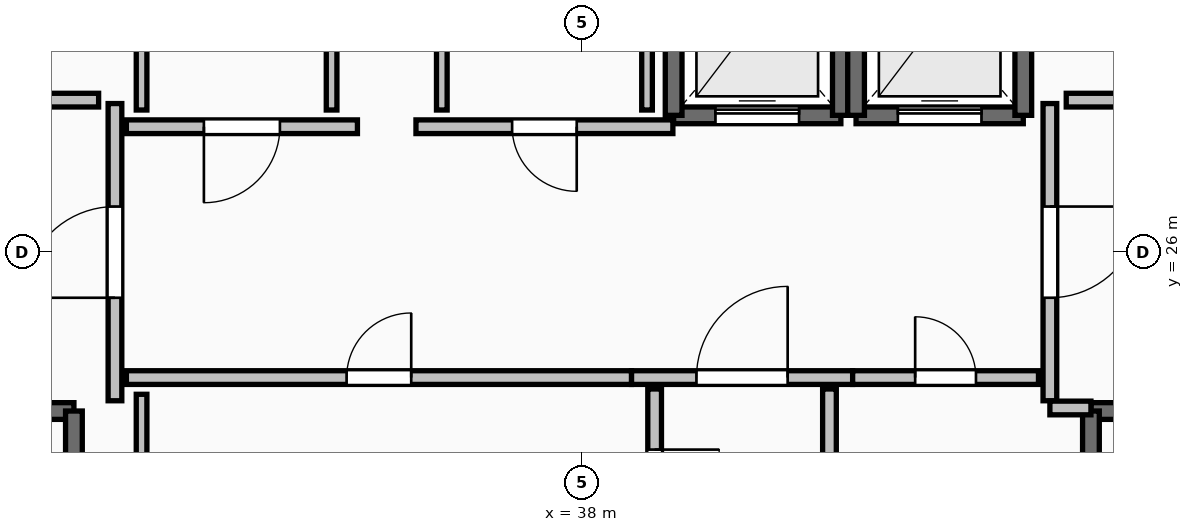
"""IFC4 building model, lengths in metres.
Left out: names, types, materials, properties, quantities, classifications, styles, units other than length and angle.
Written with IfcOpenShell. Run it as: python <this file> out.ifc"""

import sys

from ifc_helpers import new_model, si_unit, direction, frame, frame_2d, origin, place, context, subcontext, project, spatial, rectangle, extrude, element, fill, save


model = new_model("IFC4")
c1 = context("Model", 3, precision=1e-05, world=origin(), true_north=direction((0.0, 1.0)))
c2 = subcontext(c1, "Body", "Model", "MODEL_VIEW")
j1 = project(units=[si_unit("LENGTHUNIT", "METRE"), si_unit("PLANEANGLEUNIT", "RADIAN")], contexts=[c1])
p1 = place(None, origin())
s1 = spatial("IfcSite", under=j1, at=p1, CompositionType="ELEMENT")
p2 = place(p1, origin())
s2 = spatial("IfcBuilding", under=s1, at=p2, CompositionType="ELEMENT")
p3 = place(p2, frame((0.0, 0.0, 262.65)))
s3 = spatial("IfcBuildingStorey", under=s2, at=p3, CompositionType="ELEMENT", Elevation=262.65)
p4 = place(p3, frame((27.94, 23.91, 0.0), z_axis=(0.0, 0.0, 1.0), x_axis=(1.0, 0.0, 0.0)))
e1 = element("IfcWall", 1, at=p4, inside=s3, PredefinedType="SOLIDWALL", context=c2, shape_type="SweptSolid", body=[
    extrude(rectangle(XDim=3.37, YDim=0.22, at=frame_2d((1.685, 0.0))), origin(), (0.0, 0.0, 1.0), 3.29),
])
p5 = place(p4, frame((1.135, 0.0, 0.0)))
e2 = element("IfcOpeningElement", 2, at=p5, cuts=e1, PredefinedType="OPENING", context=c2, shape_type="SweptSolid", body=[
    extrude(rectangle(XDim=1.1, YDim=2.15, at=frame_2d((0.55, 1.075))), frame((0.0, 0.125, 0.0), z_axis=(0.0, -1.0, 0.0), x_axis=(1.0, 0.0, 0.0)), (0.0, 0.0, 1.0), 0.25),
])
p6 = place(p3, frame((31.31, 23.91, 0.0), z_axis=(0.0, 0.0, 1.0), x_axis=(0.0, -1.0, 0.0)))
e3 = element("IfcWall", 3, at=p6, inside=s3, PredefinedType="SOLIDWALL", context=c2, shape_type="SweptSolid", body=[
    extrude(rectangle(XDim=7.42, YDim=0.22, at=frame_2d((3.71, 0.0))), origin(), (0.0, 0.0, 1.0), 3.29),
])
p7 = place(p3, frame((44.69, 23.91, 0.0), z_axis=(0.0, 0.0, 1.0), x_axis=(1.0, 0.0, 0.0)))
e4 = element("IfcWall", 4, at=p7, inside=s3, PredefinedType="SOLIDWALL", context=c2, shape_type="SweptSolid", body=[
    extrude(rectangle(XDim=3.37, YDim=0.22, at=frame_2d((1.685, 0.0))), origin(), (0.0, 0.0, 1.0), 3.29),
])
p8 = place(p7, frame((1.135, 0.0, 0.0)))
e5 = element("IfcOpeningElement", 5, at=p8, cuts=e4, PredefinedType="OPENING", context=c2, shape_type="SweptSolid", body=[
    extrude(rectangle(XDim=1.1, YDim=2.15, at=frame_2d((0.55, 1.075))), frame((0.0, 0.125, 0.0), z_axis=(0.0, -1.0, 0.0), x_axis=(1.0, 0.0, 0.0)), (0.0, 0.0, 1.0), 0.25),
])
p9 = place(p3, frame((44.69, 16.49, 0.0), z_axis=(0.0, 0.0, 1.0), x_axis=(0.0, 1.0, 0.0)))
e6 = element("IfcWall", 6, at=p9, inside=s3, PredefinedType="SOLIDWALL", context=c2, shape_type="SweptSolid", body=[
    extrude(rectangle(XDim=7.42, YDim=0.22, at=frame_2d((3.71, 0.0))), origin(), (0.0, 0.0, 1.0), 3.29),
])
p10 = place(p3, frame((39.2, 27.8, 0.0), z_axis=(0.0, 0.0, 1.0), x_axis=(1.0, 0.0, 0.0)))
e7 = element("IfcWall", 7, at=p10, inside=s3, PredefinedType="SOLIDWALL", context=c2, shape_type="SweptSolid", body=[
    extrude(rectangle(XDim=2.2, YDim=0.22, at=frame_2d((1.1, 0.0))), origin(), (0.0, 0.0, 1.0), 3.29),
])
p11 = place(p10, frame((0.55, 0.0, 0.0)))
e8 = element("IfcOpeningElement", 8, at=p11, cuts=e7, PredefinedType="OPENING", context=c2, shape_type="SweptSolid", body=[
    extrude(rectangle(XDim=1.1, YDim=2.2, at=frame_2d((0.55, 1.1))), frame((0.0, 0.125, 0.0), z_axis=(0.0, -1.0, 0.0), x_axis=(1.0, 0.0, 0.0)), (0.0, 0.0, 1.0), 0.25),
])
for number, where, z_axis, x_axis in (
    (9, (41.4, 27.8, 0.0), (0.0, 0.0, 1.0), (0.0, 1.0, 0.0)),
    (10, (39.2, 30.4, 0.0), (0.0, 0.0, 1.0), (0.0, -1.0, 0.0)),
):
    element("IfcWall", number, at=place(p3, frame(where, z_axis=z_axis, x_axis=x_axis)), inside=s3, PredefinedType="SOLIDWALL", context=c2, shape_type="SweptSolid", body=[
        extrude(rectangle(XDim=2.6, YDim=0.22, at=frame_2d((1.3, 0.0))), origin(), (0.0, 0.0, 1.0), 3.29),
    ])
p12 = place(p3, frame((41.6, 27.8, 0.0), z_axis=(0.0, 0.0, 1.0), x_axis=(1.0, 0.0, 0.0)))
e11 = element("IfcWall", 11, at=p12, inside=s3, PredefinedType="SOLIDWALL", context=c2, shape_type="SweptSolid", body=[
    extrude(rectangle(XDim=2.2, YDim=0.22, at=frame_2d((1.1, 0.0))), origin(), (0.0, 0.0, 1.0), 3.29),
])
p13 = place(p12, frame((0.55, 0.0, 0.0)))
e12 = element("IfcOpeningElement", 12, at=p13, cuts=e11, PredefinedType="OPENING", context=c2, shape_type="SweptSolid", body=[
    extrude(rectangle(XDim=1.1, YDim=2.2, at=frame_2d((0.55, 1.1))), frame((0.0, 0.125, 0.0), z_axis=(0.0, -1.0, 0.0), x_axis=(1.0, 0.0, 0.0)), (0.0, 0.0, 1.0), 0.25),
])
for number, where, z_axis, x_axis in (
    (13, (43.8, 27.8, 0.0), (0.0, 0.0, 1.0), (0.0, 1.0, 0.0)),
    (14, (41.6, 30.4, 0.0), (0.0, 0.0, 1.0), (0.0, -1.0, 0.0)),
):
    element("IfcWall", number, at=place(p3, frame(where, z_axis=z_axis, x_axis=x_axis)), inside=s3, PredefinedType="SOLIDWALL", context=c2, shape_type="SweptSolid", body=[
        extrude(rectangle(XDim=2.6, YDim=0.22, at=frame_2d((1.3, 0.0))), origin(), (0.0, 0.0, 1.0), 3.29),
    ])
p14 = place(p3, frame((31.85, 24.045, 0.0), z_axis=(0.0, 0.0, 1.0), x_axis=(0.0, 1.0, 0.0)))
e15 = element("IfcWall", 15, at=p14, inside=s3, PredefinedType="PARTITIONING", context=c2, shape_type="SweptSolid", body=[
    extrude(rectangle(XDim=3.91, YDim=0.18, at=frame_2d((1.955, 0.0))), origin(), (0.0, 0.0, 1.0), 3.29),
])
p15 = place(p14, frame((1.355, 0.0, 0.0)))
e16 = element("IfcOpeningElement", 16, at=p15, cuts=e15, PredefinedType="OPENING", context=c2, shape_type="SweptSolid", body=[
    extrude(rectangle(XDim=1.2, YDim=2.15, at=frame_2d((0.6, 1.075))), frame((0.0, 0.105, 0.0), z_axis=(0.0, -1.0, 0.0), x_axis=(1.0, 0.0, 0.0)), (0.0, 0.0, 1.0), 0.21),
])
p16 = place(p3, frame((44.15, 27.955, 0.0), z_axis=(0.0, 0.0, 1.0), x_axis=(0.0, -1.0, 0.0)))
e17 = element("IfcWall", 17, at=p16, inside=s3, PredefinedType="PARTITIONING", context=c2, shape_type="SweptSolid", body=[
    extrude(rectangle(XDim=3.91, YDim=0.18, at=frame_2d((1.955, 0.0))), origin(), (0.0, 0.0, 1.0), 3.29),
])
p17 = place(p16, frame((1.355, 0.0, 0.0)))
e18 = element("IfcOpeningElement", 18, at=p17, cuts=e17, PredefinedType="OPENING", context=c2, shape_type="SweptSolid", body=[
    extrude(rectangle(XDim=1.2, YDim=2.15, at=frame_2d((0.6, 1.075))), frame((0.0, 0.105, 0.0), z_axis=(0.0, -1.0, 0.0), x_axis=(1.0, 0.0, 0.0)), (0.0, 0.0, 1.0), 0.21),
])
p18 = place(p3, frame((44.15, 23.95, 0.0), z_axis=(0.0, 0.0, 1.0), x_axis=(1.0, 0.0, 0.0)))
e19 = element("IfcWall", 19, at=p18, inside=s3, PredefinedType="PARTITIONING", context=c2, shape_type="SweptSolid", body=[
    extrude(rectangle(XDim=0.54, YDim=0.18, at=frame_2d((0.27, 0.0))), origin(), (0.0, 0.0, 1.0), 3.29),
])
p19 = place(p3, frame((38.645, 24.35, 0.0), z_axis=(0.0, 0.0, 1.0), x_axis=(1.0, 0.0, 0.0)))
e20 = element("IfcWall", 20, at=p19, inside=s3, PredefinedType="PARTITIONING", context=c2, shape_type="SweptSolid", body=[
    extrude(rectangle(XDim=2.91, YDim=0.18, at=frame_2d((1.455, 0.0))), origin(), (0.0, 0.0, 1.0), 3.29),
])
p20 = place(p19, frame((0.855, 0.0, 0.0)))
e21 = element("IfcOpeningElement", 21, at=p20, cuts=e20, PredefinedType="OPENING", context=c2, shape_type="SweptSolid", body=[
    extrude(rectangle(XDim=1.2, YDim=2.15, at=frame_2d((0.6, 1.075))), frame((0.0, 0.105, 0.0), z_axis=(0.0, -1.0, 0.0), x_axis=(1.0, 0.0, 0.0)), (0.0, 0.0, 1.0), 0.21),
])
p21 = place(p3, frame((41.555, 24.35, 0.0), z_axis=(0.0, 0.0, 1.0), x_axis=(1.0, 0.0, 0.0)))
e22 = element("IfcWall", 22, at=p21, inside=s3, PredefinedType="PARTITIONING", context=c2, shape_type="SweptSolid", body=[
    extrude(rectangle(XDim=2.445, YDim=0.18, at=frame_2d((1.223, 0.0))), origin(), (0.0, 0.0, 1.0), 3.29),
])
p22 = place(p21, frame((0.823, 0.0, 0.0)))
e23 = element("IfcOpeningElement", 23, at=p22, cuts=e22, PredefinedType="OPENING", context=c2, shape_type="SweptSolid", body=[
    extrude(rectangle(XDim=0.8, YDim=2.05, at=frame_2d((0.4, 1.025))), frame((0.0, 0.105, 0.0), z_axis=(0.0, -1.0, 0.0), x_axis=(1.0, 0.0, 0.0)), (0.0, 0.0, 1.0), 0.21),
])
p23 = place(p3, frame((35.04, 27.65, 0.0), z_axis=(0.0, 0.0, 1.0), x_axis=(-1.0, 0.0, 0.0)))
e24 = element("IfcWall", 24, at=p23, inside=s3, PredefinedType="PARTITIONING", context=c2, shape_type="SweptSolid", body=[
    extrude(rectangle(XDim=3.04, YDim=0.18, at=frame_2d((1.52, 0.0))), origin(), (0.0, 0.0, 1.0), 3.29),
])
p24 = place(p23, frame((1.02, 0.0, 0.0)))
e25 = element("IfcOpeningElement", 25, at=p24, cuts=e24, PredefinedType="OPENING", context=c2, shape_type="SweptSolid", body=[
    extrude(rectangle(XDim=1.0, YDim=2.15, at=frame_2d((0.5, 1.075))), frame((0.0, 0.105, 0.0), z_axis=(0.0, -1.0, 0.0), x_axis=(1.0, 0.0, 0.0)), (0.0, 0.0, 1.0), 0.21),
])
p25 = place(p3, frame((39.19, 27.65, 0.0), z_axis=(0.0, 0.0, 1.0), x_axis=(-1.0, 0.0, 0.0)))
e26 = element("IfcWall", 26, at=p25, inside=s3, PredefinedType="PARTITIONING", context=c2, shape_type="SweptSolid", body=[
    extrude(rectangle(XDim=3.38, YDim=0.18, at=frame_2d((1.69, 0.0))), origin(), (0.0, 0.0, 1.0), 3.29),
])
p26 = place(p25, frame((1.265, 0.0, 0.0)))
e27 = element("IfcOpeningElement", 27, at=p26, cuts=e26, PredefinedType="OPENING", context=c2, shape_type="SweptSolid", body=[
    extrude(rectangle(XDim=0.85, YDim=2.1, at=frame_2d((0.425, 1.05))), frame((0.0, 0.105, 0.0), z_axis=(0.0, -1.0, 0.0), x_axis=(1.0, 0.0, 0.0)), (0.0, 0.0, 1.0), 0.21),
])
p27 = place(p3, frame((32.0, 24.35, 0.0), z_axis=(0.0, 0.0, 1.0), x_axis=(1.0, 0.0, 0.0)))
e28 = element("IfcWall", 28, at=p27, inside=s3, PredefinedType="PARTITIONING", context=c2, shape_type="SweptSolid", body=[
    extrude(rectangle(XDim=6.645, YDim=0.18, at=frame_2d((3.323, 0.0))), origin(), (0.0, 0.0, 1.0), 3.29),
])
p28 = place(p27, frame((2.897, 0.0, 0.0)))
e29 = element("IfcOpeningElement", 29, at=p28, cuts=e28, PredefinedType="OPENING", context=c2, shape_type="SweptSolid", body=[
    extrude(rectangle(XDim=0.85, YDim=2.1, at=frame_2d((0.425, 1.05))), frame((0.0, 0.105, 0.0), z_axis=(0.0, -1.0, 0.0), x_axis=(1.0, 0.0, 0.0)), (0.0, 0.0, 1.0), 0.21),
])
p29 = place(p3, frame((41.25, 16.32, 0.0), z_axis=(0.0, 0.0, 1.0), x_axis=(0.0, 1.0, 0.0)))
e30 = element("IfcWall", 30, at=p29, inside=s3, PredefinedType="PARTITIONING", context=c2, shape_type="SweptSolid", body=[
    extrude(rectangle(XDim=7.88, YDim=0.18, at=frame_2d((3.94, 0.0))), origin(), (0.0, 0.0, 1.0), 2.482),
])
p30 = place(p29, frame((3.54, 0.0, 0.0)))
e31 = element("IfcOpeningElement", 31, at=p30, cuts=e30, PredefinedType="OPENING", context=c2, shape_type="SweptSolid", body=[
    extrude(rectangle(XDim=0.8, YDim=2.05, at=frame_2d((0.4, 1.025))), frame((0.0, 0.105, 0.0), z_axis=(0.0, -1.0, 0.0), x_axis=(1.0, 0.0, 0.0)), (0.0, 0.0, 1.0), 0.21),
])
p31 = place(p3, frame((38.95, 24.2, 0.0), z_axis=(0.0, 0.0, 1.0), x_axis=(0.0, -1.0, 0.0)))
e32 = element("IfcWall", 32, at=p31, inside=s3, PredefinedType="PARTITIONING", context=c2, shape_type="SweptSolid", body=[
    extrude(rectangle(XDim=2.445, YDim=0.18, at=frame_2d((1.223, 0.0))), origin(), (0.0, 0.0, 1.0), 2.482),
])
p32 = place(p31, frame((0.798, 0.0, 0.0)))
e33 = element("IfcOpeningElement", 33, at=p32, cuts=e32, PredefinedType="OPENING", context=c2, shape_type="SweptSolid", body=[
    extrude(rectangle(XDim=0.85, YDim=2.1, at=frame_2d((0.425, 1.05))), frame((0.0, 0.105, 0.0), z_axis=(0.0, -1.0, 0.0), x_axis=(1.0, 0.0, 0.0)), (0.0, 0.0, 1.0), 0.21),
])
for number, where, z_axis, x_axis in (
    (34, (31.635, 28.0, 0.0), (0.0, 0.0, 1.0), (-1.0, 0.0, 0.0)),
    (35, (45.28, 28.0, 0.0), (0.0, 0.0, 1.0), (-1.0, 0.0, 0.0)),
):
    element("IfcWall", number, at=place(p3, frame(where, z_axis=z_axis, x_axis=x_axis)), inside=s3, PredefinedType="PARTITIONING", context=c2, shape_type="SweptSolid", body=[
        extrude(rectangle(XDim=0.915, YDim=0.18, at=frame_2d((0.458, 0.0))), origin(), (0.0, 0.0, 1.0), 3.29),
    ])
for number, where, z_axis, x_axis in (
    (36, (32.2, 30.26, 0.0), (0.0, 0.0, 1.0), (0.0, -1.0, 0.0)),
    (37, (34.7, 27.87, 0.0), (0.0, 0.0, 1.0), (0.0, 1.0, 0.0)),
):
    element("IfcWall", number, at=place(p3, frame(where, z_axis=z_axis, x_axis=x_axis)), inside=s3, PredefinedType="PARTITIONING", context=c2, shape_type="SweptSolid", body=[
        extrude(rectangle(XDim=2.39, YDim=0.14, at=frame_2d((1.195, 0.0))), origin(), (0.0, 0.0, 1.0), 3.29),
    ])
p33 = place(p3, frame((36.15, 30.03, 0.0), z_axis=(0.0, 0.0, 1.0), x_axis=(0.0, -1.0, 0.0)))
e38 = element("IfcWall", 38, at=p33, inside=s3, PredefinedType="PARTITIONING", context=c2, shape_type="SweptSolid", body=[
    extrude(rectangle(XDim=2.16, YDim=0.14, at=frame_2d((1.08, 0.0))), origin(), (0.0, 0.0, 1.0), 3.29),
])
p34 = place(p3, frame((38.85, 27.87, 0.0), z_axis=(0.0, 0.0, 1.0), x_axis=(0.0, 1.0, 0.0)))
e39 = element("IfcWall", 39, at=p34, inside=s3, PredefinedType="PARTITIONING", context=c2, shape_type="SweptSolid", body=[
    extrude(rectangle(XDim=2.39, YDim=0.14, at=frame_2d((1.195, 0.0))), origin(), (0.0, 0.0, 1.0), 3.29),
])
p35 = place(p3, frame((32.2, 24.13, 0.0), z_axis=(0.0, 0.0, 1.0), x_axis=(0.0, -1.0, 0.0)))
e40 = element("IfcWall", 40, at=p35, inside=s3, PredefinedType="PARTITIONING", context=c2, shape_type="SweptSolid", body=[
    extrude(rectangle(XDim=2.46, YDim=0.14, at=frame_2d((1.23, 0.0))), origin(), (0.0, 0.0, 1.0), 2.482),
])
p36 = place(p11, origin())
e41 = element("IfcDoor", 41, at=p36, inside=s3, OperationType="SLIDING_TO_LEFT", PredefinedType="DOOR", context=c2, shape_type="SweptSolid", body=[
    extrude(rectangle(XDim=1.1, YDim=2.2, at=frame_2d((0.55, 1.1))), frame((0.0, 0.025, 0.0), z_axis=(0.0, -1.0, 0.0), x_axis=(1.0, 0.0, 0.0)), (0.0, 0.0, 1.0), 0.05),
])
fill(e8, e41)
p37 = place(p13, origin())
e42 = element("IfcDoor", 42, at=p37, inside=s3, OperationType="SLIDING_TO_LEFT", PredefinedType="DOOR", context=c2, shape_type="SweptSolid", body=[
    extrude(rectangle(XDim=1.1, YDim=2.2, at=frame_2d((0.55, 1.1))), frame((0.0, 0.025, 0.0), z_axis=(0.0, -1.0, 0.0), x_axis=(1.0, 0.0, 0.0)), (0.0, 0.0, 1.0), 0.05),
])
fill(e12, e42)
p38 = place(p15, origin())
e43 = element("IfcDoor", 43, at=p38, inside=s3, OperationType="SINGLE_SWING_LEFT", PredefinedType="DOOR", context=c2, shape_type="SweptSolid", body=[
    extrude(rectangle(XDim=1.2, YDim=2.15, at=frame_2d((0.6, 1.075))), frame((0.0, 0.025, 0.0), z_axis=(0.0, -1.0, 0.0), x_axis=(1.0, 0.0, 0.0)), (0.0, 0.0, 1.0), 0.05),
])
fill(e16, e43)
p39 = place(p17, origin())
e44 = element("IfcDoor", 44, at=p39, inside=s3, OperationType="SINGLE_SWING_LEFT", PredefinedType="DOOR", context=c2, shape_type="SweptSolid", body=[
    extrude(rectangle(XDim=1.2, YDim=2.15, at=frame_2d((0.6, 1.075))), frame((0.0, 0.025, 0.0), z_axis=(0.0, -1.0, 0.0), x_axis=(1.0, 0.0, 0.0)), (0.0, 0.0, 1.0), 0.05),
])
fill(e18, e44)
p40 = place(p20, origin())
e45 = element("IfcDoor", 45, at=p40, inside=s3, OperationType="SINGLE_SWING_RIGHT", PredefinedType="DOOR", context=c2, shape_type="SweptSolid", body=[
    extrude(rectangle(XDim=1.2, YDim=2.15, at=frame_2d((0.6, 1.075))), frame((0.0, 0.025, 0.0), z_axis=(0.0, -1.0, 0.0), x_axis=(1.0, 0.0, 0.0)), (0.0, 0.0, 1.0), 0.05),
])
fill(e21, e45)
p41 = place(p22, origin())
e46 = element("IfcDoor", 46, at=p41, inside=s3, OperationType="SINGLE_SWING_LEFT", PredefinedType="DOOR", context=c2, shape_type="SweptSolid", body=[
    extrude(rectangle(XDim=0.8, YDim=2.05, at=frame_2d((0.4, 1.025))), frame((0.0, 0.025, 0.0), z_axis=(0.0, -1.0, 0.0), x_axis=(1.0, 0.0, 0.0)), (0.0, 0.0, 1.0), 0.05),
])
fill(e23, e46)
p42 = place(p24, origin())
e47 = element("IfcDoor", 47, at=p42, inside=s3, OperationType="SINGLE_SWING_RIGHT", PredefinedType="DOOR", context=c2, shape_type="SweptSolid", body=[
    extrude(rectangle(XDim=1.0, YDim=2.15, at=frame_2d((0.5, 1.075))), frame((0.0, 0.025, 0.0), z_axis=(0.0, -1.0, 0.0), x_axis=(1.0, 0.0, 0.0)), (0.0, 0.0, 1.0), 0.05),
])
fill(e25, e47)
p43 = place(p26, origin())
e48 = element("IfcDoor", 48, at=p43, inside=s3, OperationType="SINGLE_SWING_LEFT", PredefinedType="DOOR", context=c2, shape_type="SweptSolid", body=[
    extrude(rectangle(XDim=0.85, YDim=2.1, at=frame_2d((0.425, 1.05))), frame((0.0, 0.025, 0.0), z_axis=(0.0, -1.0, 0.0), x_axis=(1.0, 0.0, 0.0)), (0.0, 0.0, 1.0), 0.05),
])
fill(e27, e48)
p44 = place(p28, origin())
e49 = element("IfcDoor", 49, at=p44, inside=s3, OperationType="SINGLE_SWING_RIGHT", PredefinedType="DOOR", context=c2, shape_type="SweptSolid", body=[
    extrude(rectangle(XDim=0.85, YDim=2.1, at=frame_2d((0.425, 1.05))), frame((0.0, 0.025, 0.0), z_axis=(0.0, -1.0, 0.0), x_axis=(1.0, 0.0, 0.0)), (0.0, 0.0, 1.0), 0.05),
])
fill(e29, e49)
p45 = place(p32, origin())
e50 = element("IfcDoor", 50, at=p45, inside=s3, OperationType="SINGLE_SWING_LEFT", PredefinedType="DOOR", context=c2, shape_type="SweptSolid", body=[
    extrude(rectangle(XDim=0.85, YDim=2.1, at=frame_2d((0.425, 1.05))), frame((0.0, 0.025, 0.0), z_axis=(0.0, -1.0, 0.0), x_axis=(1.0, 0.0, 0.0)), (0.0, 0.0, 1.0), 0.05),
])
fill(e33, e50)
save(model, sys.argv[1])
